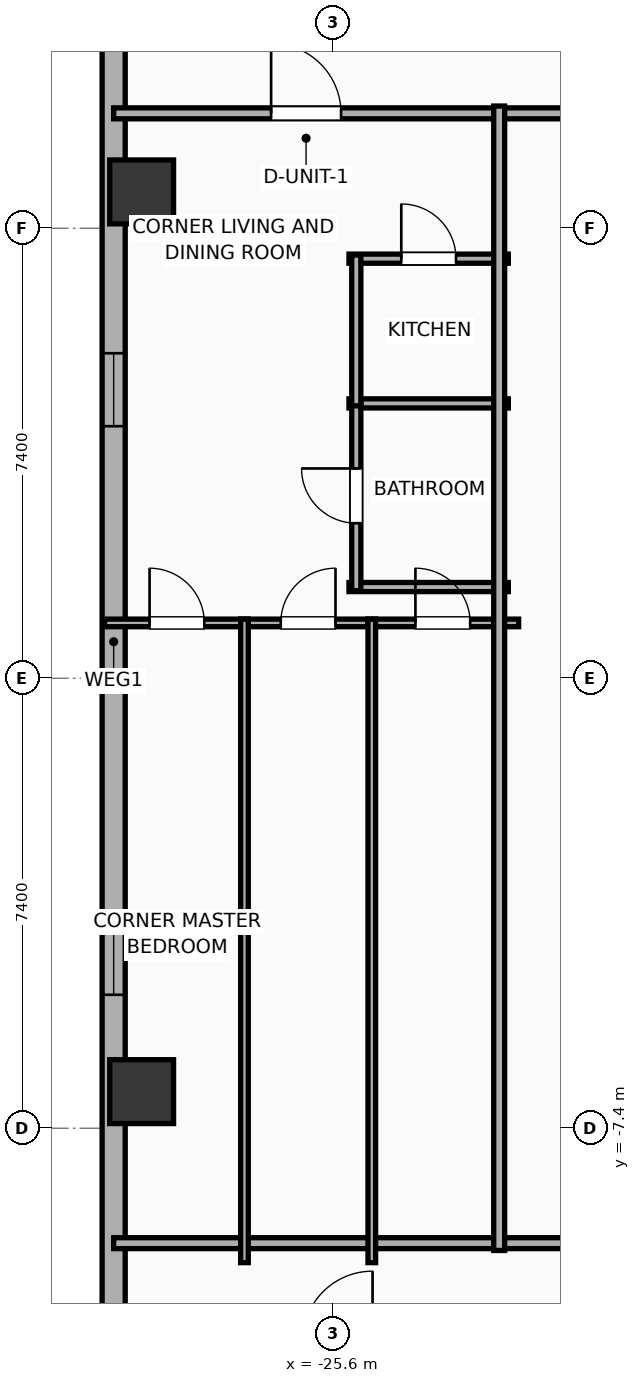
"""IFC4 building model, lengths in metres.
Left out: names, types, materials, properties, quantities, classifications, styles, units other than length and angle.
Written with IfcOpenShell. Run it as: python <this file> out.ifc"""

import sys

from ifc_helpers import new_model, si_unit, direction, frame, frame_2d, origin, origin_2d, place, context, subcontext, project, spatial, rectangle, hollow_rectangle, extrude, element, fill, save


model = new_model("IFC4")
c1 = context("Model", 3, precision=1e-05, world=origin(), true_north=direction((0.0, 1.0)))
c2 = subcontext(c1, "Body", "Model", "MODEL_VIEW")
j1 = project(units=[si_unit("LENGTHUNIT", "METRE"), si_unit("PLANEANGLEUNIT", "RADIAN")], contexts=[c1])
p1 = place(None, origin())
s1 = spatial("IfcSite", under=j1, at=p1, CompositionType="ELEMENT")
p2 = place(p1, origin())
s2 = spatial("IfcBuilding", under=s1, at=p2, CompositionType="ELEMENT")
p3 = place(p2, frame((0.0, 0.0, 89.7)))
s3 = spatial("IfcBuildingStorey", under=s2, at=p3, CompositionType="ELEMENT", Elevation=89.7)
for number, where, z_axis, x_axis in (
    (1, (-28.75, 7.998, 0.0), (0.0, 0.0, 1.0), (1.0, 0.0, 0.0)),
    (2, (-28.75, -6.798, 0.0), (0.0, 0.0, 1.0), (1.0, 0.0, 0.0)),
):
    element("IfcColumn", number, at=place(p3, frame(where, z_axis=z_axis, x_axis=x_axis)), inside=s3, PredefinedType="COLUMN", context=c2, shape_type="SweptSolid", body=[
        extrude(hollow_rectangle(XDim=1.05, YDim=1.05, WallThickness=0.036, at=origin_2d()), origin(), (0.0, 0.0, 1.0), 3.9),
    ])
p4 = place(p3, frame((-29.21, -16.581, 0.0), z_axis=(0.0, 0.0, 1.0), x_axis=(0.0, 1.0, 0.0)))
e3 = element("IfcWall", 3, at=p4, inside=s3, PredefinedType="ELEMENTEDWALL", context=c2, shape_type="SweptSolid", body=[
    extrude(rectangle(XDim=34.363, YDim=0.38, at=frame_2d((17.181, 0.0))), origin(), (0.0, 0.0, 1.0), 2.54),
])
p5 = place(p4, frame((31.487, 0.0, 0.75)))
e4 = element("IfcOpeningElement", 4, at=p5, cuts=e3, PredefinedType="OPENING", context=c2, shape_type="SweptSolid", body=[
    extrude(rectangle(XDim=1.2, YDim=1.63, at=frame_2d((0.6, 0.815))), frame((0.0, 0.2, 0.0), z_axis=(0.0, -1.0, 0.0), x_axis=(1.0, 0.0, 0.0)), (0.0, 0.0, 1.0), 0.4),
])
p6 = place(p4, frame((20.726, 0.0, 0.75)))
e5 = element("IfcOpeningElement", 5, at=p6, cuts=e3, PredefinedType="OPENING", context=c2, shape_type="SweptSolid", body=[
    extrude(rectangle(XDim=1.2, YDim=1.63, at=frame_2d((0.6, 0.815))), frame((0.0, 0.2, 0.0), z_axis=(0.0, -1.0, 0.0), x_axis=(1.0, 0.0, 0.0)), (0.0, 0.0, 1.0), 0.4),
])
p7 = place(p4, frame((11.376, 0.0, 0.75)))
e6 = element("IfcOpeningElement", 6, at=p7, cuts=e3, PredefinedType="OPENING", context=c2, shape_type="SweptSolid", body=[
    extrude(rectangle(XDim=1.2, YDim=1.63, at=frame_2d((0.6, 0.815))), frame((0.0, 0.2, 0.0), z_axis=(0.0, -1.0, 0.0), x_axis=(1.0, 0.0, 0.0)), (0.0, 0.0, 1.0), 0.4),
])
p8 = place(p3, frame((-29.21, 9.29, 0.0), z_axis=(0.0, 0.0, 1.0), x_axis=(1.0, 0.0, 0.0)))
e7 = element("IfcWall", 7, at=p8, inside=s3, PredefinedType="PARTITIONING", context=c2, shape_type="SweptSolid", body=[
    extrude(rectangle(XDim=19.33, YDim=0.18, at=frame_2d((9.665, 0.0))), origin(), (0.0, 0.0, 1.0), 3.65),
])
p9 = place(p8, frame((2.589, 0.0, 0.0)))
e8 = element("IfcOpeningElement", 8, at=p9, cuts=e7, PredefinedType="OPENING", context=c2, shape_type="SweptSolid", body=[
    extrude(rectangle(XDim=1.15, YDim=2.05, at=frame_2d((0.575, 1.025))), frame((0.0, 0.1, 0.0), z_axis=(0.0, -1.0, 0.0), x_axis=(1.0, 0.0, 0.0)), (0.0, 0.0, 1.0), 0.2),
])
p10 = place(p3, frame((-29.21, -9.29, 0.0), z_axis=(0.0, 0.0, 1.0), x_axis=(1.0, 0.0, 0.0)))
e9 = element("IfcWall", 9, at=p10, inside=s3, PredefinedType="PARTITIONING", context=c2, shape_type="SweptSolid", body=[
    extrude(rectangle(XDim=19.33, YDim=0.18, at=frame_2d((9.665, 0.0))), origin(), (0.0, 0.0, 1.0), 3.65),
])
p11 = place(p3, frame((-25.34, 6.9, 0.0), z_axis=(0.0, 0.0, 1.0), x_axis=(1.0, 0.0, 0.0)))
e10 = element("IfcWall", 10, at=p11, inside=s3, PredefinedType="PLUMBINGWALL", context=c2, shape_type="SweptSolid", body=[
    extrude(rectangle(XDim=2.62, YDim=0.15, at=frame_2d((1.31, 0.0))), origin(), (0.0, 0.0, 1.0), 3.65),
])
p12 = place(p11, frame((0.86, 0.0, 0.0)))
e11 = element("IfcOpeningElement", 11, at=p12, cuts=e10, PredefinedType="OPENING", context=c2, shape_type="SweptSolid", body=[
    extrude(rectangle(XDim=0.9, YDim=2.05, at=frame_2d((0.45, 1.025))), frame((0.0, 0.085, 0.0), z_axis=(0.0, -1.0, 0.0), x_axis=(1.0, 0.0, 0.0)), (0.0, 0.0, 1.0), 0.17),
])
for number, where, z_axis, x_axis in (
    (12, (-25.34, 4.52, 0.0), (0.0, 0.0, 1.0), (1.0, 0.0, 0.0)),
    (13, (-25.34, 1.5, 0.0), (0.0, 0.0, 1.0), (1.0, 0.0, 0.0)),
):
    element("IfcWall", number, at=place(p3, frame(where, z_axis=z_axis, x_axis=x_axis)), inside=s3, PredefinedType="PLUMBINGWALL", context=c2, shape_type="SweptSolid", body=[
        extrude(rectangle(XDim=2.62, YDim=0.15, at=frame_2d((1.31, 0.0))), origin(), (0.0, 0.0, 1.0), 3.65),
    ])
p13 = place(p3, frame((-25.22, 1.44, 0.0), z_axis=(0.0, 0.0, 1.0), x_axis=(0.0, 1.0, 0.0)))
e14 = element("IfcWall", 14, at=p13, inside=s3, PredefinedType="PLUMBINGWALL", context=c2, shape_type="SweptSolid", body=[
    extrude(rectangle(XDim=3.12, YDim=0.15, at=frame_2d((1.56, 0.0))), origin(), (0.0, 0.0, 1.0), 3.65),
])
p14 = place(p13, frame((1.11, 0.0, 0.0)))
e15 = element("IfcOpeningElement", 15, at=p14, cuts=e14, PredefinedType="OPENING", context=c2, shape_type="SweptSolid", body=[
    extrude(rectangle(XDim=0.9, YDim=2.05, at=frame_2d((0.45, 1.025))), frame((0.0, 0.085, 0.0), z_axis=(0.0, -1.0, 0.0), x_axis=(1.0, 0.0, 0.0)), (0.0, 0.0, 1.0), 0.17),
])
p15 = place(p3, frame((-25.22, 4.48, 0.0), z_axis=(0.0, 0.0, 1.0), x_axis=(0.0, 1.0, 0.0)))
e16 = element("IfcWall", 16, at=p15, inside=s3, PredefinedType="PLUMBINGWALL", context=c2, shape_type="SweptSolid", body=[
    extrude(rectangle(XDim=2.48, YDim=0.15, at=frame_2d((1.24, 0.0))), origin(), (0.0, 0.0, 1.0), 3.65),
])
p16 = place(p3, frame((-29.36, 0.91, 0.0), z_axis=(0.0, 0.0, 1.0), x_axis=(1.0, 0.0, 0.0)))
e17 = element("IfcWall", 17, at=p16, inside=s3, PredefinedType="PARTITIONING", context=c2, shape_type="SweptSolid", body=[
    extrude(rectangle(XDim=2.364, YDim=0.125, at=frame_2d((1.182, 0.0))), origin(), (0.0, 0.0, 1.0), 3.65),
])
p17 = place(p16, frame((0.74, 0.0, 0.0)))
e18 = element("IfcOpeningElement", 18, at=p17, cuts=e17, PredefinedType="OPENING", context=c2, shape_type="SweptSolid", body=[
    extrude(rectangle(XDim=0.9, YDim=2.05, at=frame_2d((0.45, 1.025))), frame((0.0, 0.073, 0.0), z_axis=(0.0, -1.0, 0.0), x_axis=(1.0, 0.0, 0.0)), (0.0, 0.0, 1.0), 0.145),
])
p18 = place(p3, frame((-27.122, 0.91, 0.0), z_axis=(0.0, 0.0, 1.0), x_axis=(1.0, 0.0, 0.0)))
e19 = element("IfcWall", 19, at=p18, inside=s3, PredefinedType="PARTITIONING", context=c2, shape_type="SweptSolid", body=[
    extrude(rectangle(XDim=2.219, YDim=0.125, at=frame_2d((1.109, 0.0))), origin(), (0.0, 0.0, 1.0), 3.65),
])
p19 = place(p18, frame((0.659, 0.0, 0.0)))
e20 = element("IfcOpeningElement", 20, at=p19, cuts=e19, PredefinedType="OPENING", context=c2, shape_type="SweptSolid", body=[
    extrude(rectangle(XDim=0.9, YDim=2.05, at=frame_2d((0.45, 1.025))), frame((0.0, 0.073, 0.0), z_axis=(0.0, -1.0, 0.0), x_axis=(1.0, 0.0, 0.0)), (0.0, 0.0, 1.0), 0.145),
])
p20 = place(p3, frame((-25.028, 0.91, 0.0), z_axis=(0.0, 0.0, 1.0), x_axis=(1.0, 0.0, 0.0)))
e21 = element("IfcWall", 21, at=p20, inside=s3, PredefinedType="PARTITIONING", context=c2, shape_type="SweptSolid", body=[
    extrude(rectangle(XDim=2.478, YDim=0.125, at=frame_2d((1.239, 0.0))), origin(), (0.0, 0.0, 1.0), 3.65),
])
p21 = place(p20, frame((0.78, 0.0, 0.0)))
e22 = element("IfcOpeningElement", 22, at=p21, cuts=e21, PredefinedType="OPENING", context=c2, shape_type="SweptSolid", body=[
    extrude(rectangle(XDim=0.9, YDim=2.05, at=frame_2d((0.45, 1.025))), frame((0.0, 0.073, 0.0), z_axis=(0.0, -1.0, 0.0), x_axis=(1.0, 0.0, 0.0)), (0.0, 0.0, 1.0), 0.145),
])
for number, where, z_axis, x_axis in (
    (23, (-24.965, -9.61, 0.0), (0.0, 0.0, 1.0), (0.0, 1.0, 0.0)),
    (24, (-27.059, -9.61, 0.0), (0.0, 0.0, 1.0), (0.0, 1.0, 0.0)),
):
    element("IfcWall", number, at=place(p3, frame(where, z_axis=z_axis, x_axis=x_axis)), inside=s3, PredefinedType="PARTITIONING", context=c2, shape_type="SweptSolid", body=[
        extrude(rectangle(XDim=10.58, YDim=0.125, at=frame_2d((5.29, 0.0))), origin(), (0.0, 0.0, 1.0), 3.65),
    ])
p22 = place(p3, frame((-22.87, -9.41, 0.0), z_axis=(0.0, 0.0, 1.0), x_axis=(0.0, 1.0, 0.0)))
e25 = element("IfcWall", 25, at=p22, inside=s3, PredefinedType="PARTITIONING", context=c2, shape_type="SweptSolid", body=[
    extrude(rectangle(XDim=18.82, YDim=0.18, at=frame_2d((9.41, 0.0))), origin(), (0.0, 0.0, 1.0), 3.65),
])
p23 = place(p6, origin())
e26 = element("IfcWindow", 26, at=p23, inside=s3, PartitioningType="SINGLE_PANEL", PredefinedType="WINDOW", context=c2, shape_type="SweptSolid", body=[
    extrude(rectangle(XDim=1.2, YDim=1.63, at=frame_2d((0.6, 0.815))), frame((0.0, 0.03, 0.0), z_axis=(0.0, -1.0, 0.0), x_axis=(1.0, 0.0, 0.0)), (0.0, 0.0, 1.0), 0.06),
])
fill(e5, e26)
p24 = place(p7, origin())
e27 = element("IfcWindow", 27, at=p24, inside=s3, PartitioningType="SINGLE_PANEL", PredefinedType="WINDOW", context=c2, shape_type="SweptSolid", body=[
    extrude(rectangle(XDim=1.2, YDim=1.63, at=frame_2d((0.6, 0.815))), frame((0.0, 0.03, 0.0), z_axis=(0.0, -1.0, 0.0), x_axis=(1.0, 0.0, 0.0)), (0.0, 0.0, 1.0), 0.06),
])
fill(e6, e27)
p25 = place(p9, origin())
e28 = element("IfcDoor", 28, at=p25, inside=s3, OperationType="SINGLE_SWING_LEFT", PredefinedType="DOOR", context=c2, shape_type="SweptSolid", body=[
    extrude(rectangle(XDim=1.15, YDim=2.05, at=frame_2d((0.575, 1.025))), frame((0.0, 0.025, 0.0), z_axis=(0.0, -1.0, 0.0), x_axis=(1.0, 0.0, 0.0)), (0.0, 0.0, 1.0), 0.05),
])
fill(e8, e28)
p26 = place(p12, origin())
e29 = element("IfcDoor", 29, at=p26, inside=s3, OperationType="SINGLE_SWING_LEFT", PredefinedType="DOOR", context=c2, shape_type="SweptSolid", body=[
    extrude(rectangle(XDim=0.9, YDim=2.05, at=frame_2d((0.45, 1.025))), frame((0.0, 0.025, 0.0), z_axis=(0.0, -1.0, 0.0), x_axis=(1.0, 0.0, 0.0)), (0.0, 0.0, 1.0), 0.05),
])
fill(e11, e29)
p27 = place(p14, origin())
e30 = element("IfcDoor", 30, at=p27, inside=s3, OperationType="SINGLE_SWING_RIGHT", PredefinedType="DOOR", context=c2, shape_type="SweptSolid", body=[
    extrude(rectangle(XDim=0.9, YDim=2.05, at=frame_2d((0.45, 1.025))), frame((0.0, 0.025, 0.0), z_axis=(0.0, -1.0, 0.0), x_axis=(1.0, 0.0, 0.0)), (0.0, 0.0, 1.0), 0.05),
])
fill(e15, e30)
p28 = place(p17, origin())
e31 = element("IfcDoor", 31, at=p28, inside=s3, OperationType="SINGLE_SWING_LEFT", PredefinedType="DOOR", context=c2, shape_type="SweptSolid", body=[
    extrude(rectangle(XDim=0.9, YDim=2.05, at=frame_2d((0.45, 1.025))), frame((0.0, 0.025, 0.0), z_axis=(0.0, -1.0, 0.0), x_axis=(1.0, 0.0, 0.0)), (0.0, 0.0, 1.0), 0.05),
])
fill(e18, e31)
p29 = place(p19, origin())
e32 = element("IfcDoor", 32, at=p29, inside=s3, OperationType="SINGLE_SWING_RIGHT", PredefinedType="DOOR", context=c2, shape_type="SweptSolid", body=[
    extrude(rectangle(XDim=0.9, YDim=2.05, at=frame_2d((0.45, 1.025))), frame((0.0, 0.025, 0.0), z_axis=(0.0, -1.0, 0.0), x_axis=(1.0, 0.0, 0.0)), (0.0, 0.0, 1.0), 0.05),
])
fill(e20, e32)
p30 = place(p21, origin())
e33 = element("IfcDoor", 33, at=p30, inside=s3, OperationType="SINGLE_SWING_LEFT", PredefinedType="DOOR", context=c2, shape_type="SweptSolid", body=[
    extrude(rectangle(XDim=0.9, YDim=2.05, at=frame_2d((0.45, 1.025))), frame((0.0, 0.025, 0.0), z_axis=(0.0, -1.0, 0.0), x_axis=(1.0, 0.0, 0.0)), (0.0, 0.0, 1.0), 0.05),
])
fill(e22, e33)
save(model, sys.argv[1])
